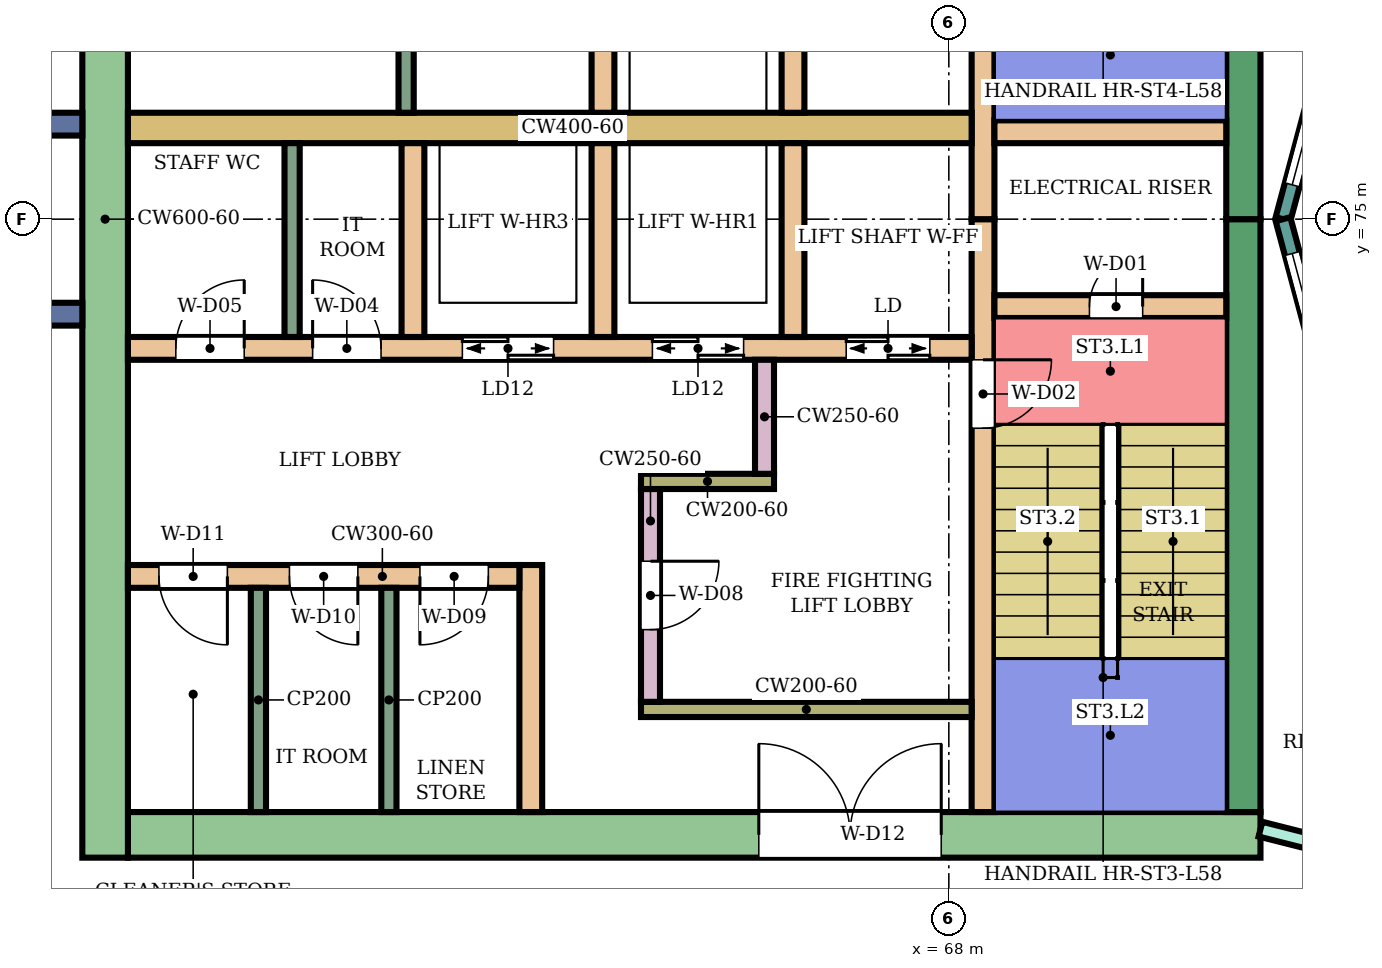
"""IFC4 building model, lengths in metres.
Left out: names, types, materials, properties, quantities, classifications, styles, units other than length and angle.
Written with IfcOpenShell. Run it as: python <this file> out.ifc"""

import sys

from ifc_helpers import new_model, si_unit, direction, frame, frame_2d, origin, place, context, subcontext, project, spatial, rectangle, extrude, element, fill, save


model = new_model("IFC4")
c1 = context("Model", 3, precision=1e-05, world=origin(), true_north=direction((0.0, 1.0)))
c2 = subcontext(c1, "Body", "Model", "MODEL_VIEW")
j1 = project(units=[si_unit("LENGTHUNIT", "METRE"), si_unit("PLANEANGLEUNIT", "RADIAN")], contexts=[c1])
p1 = place(None, origin())
s1 = spatial("IfcSite", under=j1, at=p1, CompositionType="ELEMENT")
p2 = place(p1, origin())
s2 = spatial("IfcBuilding", under=s1, at=p2, CompositionType="ELEMENT")
p3 = place(p2, frame((0.0, 0.0, 254.1)))
s3 = spatial("IfcBuildingStorey", under=s2, at=p3, CompositionType="ELEMENT", Elevation=254.1)
p4 = place(p3, frame((72.1, 66.9, 0.0), z_axis=(0.0, 0.0, 1.0), x_axis=(-1.0, 0.0, 0.0)))
e1 = element("IfcWall", 1, at=p4, inside=s3, PredefinedType="SHEAR", context=c2, shape_type="SweptSolid", body=[
    extrude(rectangle(XDim=14.9, YDim=0.6, at=frame_2d((7.45, 0.0))), origin(), (0.0, 0.0, 1.0), 3.88),
])
p5 = place(p4, frame((4.2, 0.0, 0.0)))
e2 = element("IfcOpeningElement", 2, at=p5, cuts=e1, PredefinedType="OPENING", context=c2, shape_type="SweptSolid", body=[
    extrude(rectangle(XDim=2.4, YDim=2.4, at=frame_2d((1.2, 1.2))), frame((0.0, 0.31, 0.0), z_axis=(0.0, -1.0, 0.0), x_axis=(1.0, 0.0, 0.0)), (0.0, 0.0, 1.0), 0.62),
])
for number, where, z_axis, x_axis in (
    (3, (71.875, 75.0, 0.0), (0.0, 0.0, 1.0), (0.0, -1.0, 0.0)),
    (4, (71.875, 82.8, 0.0), (0.0, 0.0, 1.0), (0.0, -1.0, 0.0)),
):
    element("IfcWall", number, at=place(p3, frame(where, z_axis=z_axis, x_axis=x_axis)), inside=s3, PredefinedType="SHEAR", context=c2, shape_type="SweptSolid", body=[
        extrude(rectangle(XDim=7.8, YDim=0.45, at=frame_2d((3.9, 0.0))), origin(), (0.0, 0.0, 1.0), 3.88),
    ])
p6 = place(p3, frame((56.9, 83.4, 0.0), z_axis=(0.0, 0.0, 1.0), x_axis=(0.0, -1.0, 0.0)))
e5 = element("IfcWall", 5, at=p6, inside=s3, PredefinedType="SHEAR", context=c2, shape_type="SweptSolid", body=[
    extrude(rectangle(XDim=16.8, YDim=0.6, at=frame_2d((8.4, 0.0))), origin(), (0.0, 0.0, 1.0), 3.88),
])
p7 = place(p3, frame((68.45, 75.0, 0.0), z_axis=(0.0, 0.0, 1.0), x_axis=(0.0, -1.0, 0.0)))
e6 = element("IfcWall", 6, at=p7, inside=s3, PredefinedType="SHEAR", context=c2, shape_type="SweptSolid", body=[
    extrude(rectangle(XDim=7.8, YDim=0.3, at=frame_2d((3.9, 0.0))), origin(), (0.0, 0.0, 1.0), 3.88),
])
p8 = place(p7, frame((1.85, 0.0, 0.0)))
e7 = element("IfcOpeningElement", 7, at=p8, cuts=e6, PredefinedType="OPENING", context=c2, shape_type="SweptSolid", body=[
    extrude(rectangle(XDim=0.9, YDim=2.1, at=frame_2d((0.45, 1.05))), frame((0.0, 0.16, 0.0), z_axis=(0.0, -1.0, 0.0), x_axis=(1.0, 0.0, 0.0)), (0.0, 0.0, 1.0), 0.32),
])
p9 = place(p3, frame((68.45, 82.8, 0.0), z_axis=(0.0, 0.0, 1.0), x_axis=(0.0, -1.0, 0.0)))
e8 = element("IfcWall", 8, at=p9, inside=s3, PredefinedType="SHEAR", context=c2, shape_type="SweptSolid", body=[
    extrude(rectangle(XDim=7.8, YDim=0.3, at=frame_2d((3.9, 0.0))), origin(), (0.0, 0.0, 1.0), 3.88),
])
p10 = place(p9, frame((0.45, 0.0, 0.0)))
e9 = element("IfcOpeningElement", 9, at=p10, cuts=e8, PredefinedType="OPENING", context=c2, shape_type="SweptSolid", body=[
    extrude(rectangle(XDim=0.9, YDim=2.1, at=frame_2d((0.45, 1.05))), frame((0.0, 0.16, 0.0), z_axis=(0.0, -1.0, 0.0), x_axis=(1.0, 0.0, 0.0)), (0.0, 0.0, 1.0), 0.32),
])
p11 = place(p3, frame((71.65, 73.85, 0.0), z_axis=(0.0, 0.0, 1.0), x_axis=(-1.0, 0.0, 0.0)))
e10 = element("IfcWall", 10, at=p11, inside=s3, PredefinedType="SHEAR", context=c2, shape_type="SweptSolid", body=[
    extrude(rectangle(XDim=3.05, YDim=0.3, at=frame_2d((1.525, 0.0))), origin(), (0.0, 0.0, 1.0), 3.88),
])
p12 = place(p11, frame((1.1, 0.0, 0.0)))
e11 = element("IfcOpeningElement", 11, at=p12, cuts=e10, PredefinedType="OPENING", context=c2, shape_type="SweptSolid", body=[
    extrude(rectangle(XDim=0.7, YDim=2.0, at=frame_2d((0.35, 1.0))), frame((0.0, 0.16, 0.0), z_axis=(0.0, -1.0, 0.0), x_axis=(1.0, 0.0, 0.0)), (0.0, 0.0, 1.0), 0.32),
])
p13 = place(p3, frame((71.65, 76.15, 0.0), z_axis=(0.0, 0.0, 1.0), x_axis=(-1.0, 0.0, 0.0)))
e12 = element("IfcWall", 12, at=p13, inside=s3, PredefinedType="SHEAR", context=c2, shape_type="SweptSolid", body=[
    extrude(rectangle(XDim=3.05, YDim=0.3, at=frame_2d((1.525, 0.0))), origin(), (0.0, 0.0, 1.0), 3.88),
])
p14 = place(p3, frame((68.3, 73.3, 0.0), z_axis=(0.0, 0.0, 1.0), x_axis=(-1.0, 0.0, 0.0)))
e13 = element("IfcWall", 13, at=p14, inside=s3, PredefinedType="SHEAR", context=c2, shape_type="SweptSolid", body=[
    extrude(rectangle(XDim=11.1, YDim=0.3, at=frame_2d((5.55, 0.0))), origin(), (0.0, 0.0, 1.0), 3.88),
])
p15 = place(p14, frame((0.55, 0.0, 0.0)))
e14 = element("IfcOpeningElement", 14, at=p15, cuts=e13, PredefinedType="OPENING", context=c2, shape_type="SweptSolid", body=[
    extrude(rectangle(XDim=1.1, YDim=2.1, at=frame_2d((0.55, 1.05))), frame((0.0, 0.16, 0.0), z_axis=(0.0, -1.0, 0.0), x_axis=(1.0, 0.0, 0.0)), (0.0, 0.0, 1.0), 0.32),
])
p16 = place(p14, frame((3.0, 0.0, 0.0)))
e15 = element("IfcOpeningElement", 15, at=p16, cuts=e13, PredefinedType="OPENING", context=c2, shape_type="SweptSolid", body=[
    extrude(rectangle(XDim=1.2, YDim=2.1, at=frame_2d((0.6, 1.05))), frame((0.0, 0.16, 0.0), z_axis=(0.0, -1.0, 0.0), x_axis=(1.0, 0.0, 0.0)), (0.0, 0.0, 1.0), 0.32),
])
p17 = place(p14, frame((5.5, 0.0, 0.0)))
e16 = element("IfcOpeningElement", 16, at=p17, cuts=e13, PredefinedType="OPENING", context=c2, shape_type="SweptSolid", body=[
    extrude(rectangle(XDim=1.2, YDim=2.1, at=frame_2d((0.6, 1.05))), frame((0.0, 0.16, 0.0), z_axis=(0.0, -1.0, 0.0), x_axis=(1.0, 0.0, 0.0)), (0.0, 0.0, 1.0), 0.32),
])
p18 = place(p14, frame((7.77, 0.0, 0.0)))
e17 = element("IfcOpeningElement", 17, at=p18, cuts=e13, PredefinedType="OPENING", context=c2, shape_type="SweptSolid", body=[
    extrude(rectangle(XDim=0.9, YDim=2.1, at=frame_2d((0.45, 1.05))), frame((0.0, 0.16, 0.0), z_axis=(0.0, -1.0, 0.0), x_axis=(1.0, 0.0, 0.0)), (0.0, 0.0, 1.0), 0.32),
])
p19 = place(p14, frame((9.57, 0.0, 0.0)))
e18 = element("IfcOpeningElement", 18, at=p19, cuts=e13, PredefinedType="OPENING", context=c2, shape_type="SweptSolid", body=[
    extrude(rectangle(XDim=0.9, YDim=2.1, at=frame_2d((0.45, 1.05))), frame((0.0, 0.16, 0.0), z_axis=(0.0, -1.0, 0.0), x_axis=(1.0, 0.0, 0.0)), (0.0, 0.0, 1.0), 0.32),
])
p20 = place(p3, frame((68.3, 76.2, 0.0), z_axis=(0.0, 0.0, 1.0), x_axis=(-1.0, 0.0, 0.0)))
e19 = element("IfcWall", 19, at=p20, inside=s3, PredefinedType="SHEAR", context=c2, shape_type="SweptSolid", body=[
    extrude(rectangle(XDim=11.1, YDim=0.4, at=frame_2d((5.55, 0.0))), origin(), (0.0, 0.0, 1.0), 3.88),
])
for number, where, z_axis, x_axis in (
    (20, (65.95, 76.0, 0.0), (0.0, 0.0, 1.0), (0.0, -1.0, 0.0)),
    (21, (63.45, 76.0, 0.0), (0.0, 0.0, 1.0), (0.0, -1.0, 0.0)),
    (22, (60.95, 76.0, 0.0), (0.0, 0.0, 1.0), (0.0, -1.0, 0.0)),
    (23, (65.95, 78.95, 0.0), (0.0, 0.0, 1.0), (0.0, -1.0, 0.0)),
    (24, (63.45, 78.95, 0.0), (0.0, 0.0, 1.0), (0.0, -1.0, 0.0)),
):
    element("IfcWall", number, at=place(p3, frame(where, z_axis=z_axis, x_axis=x_axis)), inside=s3, PredefinedType="SHEAR", context=c2, shape_type="SweptSolid", body=[
        extrude(rectangle(XDim=2.55, YDim=0.3, at=frame_2d((1.275, 0.0))), origin(), (0.0, 0.0, 1.0), 3.88),
    ])
p21 = place(p3, frame((68.3, 68.55, 0.0), z_axis=(0.0, 0.0, 1.0), x_axis=(-1.0, 0.0, 0.0)))
e25 = element("IfcWall", 25, at=p21, inside=s3, PredefinedType="SHEAR", context=c2, shape_type="SweptSolid", body=[
    extrude(rectangle(XDim=4.35, YDim=0.2, at=frame_2d((2.175, 0.0))), origin(), (0.0, 0.0, 1.0), 3.88),
])
p22 = place(p3, frame((64.075, 71.45, 0.0), z_axis=(0.0, 0.0, 1.0), x_axis=(0.0, -1.0, 0.0)))
e26 = element("IfcWall", 26, at=p22, inside=s3, PredefinedType="SHEAR", context=c2, shape_type="SweptSolid", body=[
    extrude(rectangle(XDim=2.8, YDim=0.25, at=frame_2d((1.4, 0.0))), origin(), (0.0, 0.0, 1.0), 3.88),
])
p23 = place(p22, frame((0.95, 0.0, 0.0)))
e27 = element("IfcOpeningElement", 27, at=p23, cuts=e26, PredefinedType="OPENING", context=c2, shape_type="SweptSolid", body=[
    extrude(rectangle(XDim=0.9, YDim=2.1, at=frame_2d((0.45, 1.05))), frame((0.0, 0.135, 0.0), z_axis=(0.0, -1.0, 0.0), x_axis=(1.0, 0.0, 0.0)), (0.0, 0.0, 1.0), 0.27),
])
p24 = place(p3, frame((65.7, 71.55, 0.0), z_axis=(0.0, 0.0, 1.0), x_axis=(-1.0, 0.0, 0.0)))
e28 = element("IfcWall", 28, at=p24, inside=s3, PredefinedType="SHEAR", context=c2, shape_type="SweptSolid", body=[
    extrude(rectangle(XDim=1.75, YDim=0.2, at=frame_2d((0.875, 0.0))), origin(), (0.0, 0.0, 1.0), 3.88),
])
p25 = place(p3, frame((65.575, 73.15, 0.0), z_axis=(0.0, 0.0, 1.0), x_axis=(0.0, -1.0, 0.0)))
e29 = element("IfcWall", 29, at=p25, inside=s3, PredefinedType="SHEAR", context=c2, shape_type="SweptSolid", body=[
    extrude(rectangle(XDim=1.5, YDim=0.25, at=frame_2d((0.75, 0.0))), origin(), (0.0, 0.0, 1.0), 3.88),
])
p26 = place(p3, frame((62.5, 70.45, 0.0), z_axis=(0.0, 0.0, 1.0), x_axis=(0.0, -1.0, 0.0)))
e30 = element("IfcWall", 30, at=p26, inside=s3, PredefinedType="SHEAR", context=c2, shape_type="SweptSolid", body=[
    extrude(rectangle(XDim=3.25, YDim=0.3, at=frame_2d((1.625, 0.0))), origin(), (0.0, 0.0, 1.0), 3.88),
])
p27 = place(p3, frame((62.35, 70.3, 0.0), z_axis=(0.0, 0.0, 1.0), x_axis=(-1.0, 0.0, 0.0)))
e31 = element("IfcWall", 31, at=p27, inside=s3, PredefinedType="SHEAR", context=c2, shape_type="SweptSolid", body=[
    extrude(rectangle(XDim=5.15, YDim=0.3, at=frame_2d((2.575, 0.0))), origin(), (0.0, 0.0, 1.0), 3.88),
])
p28 = place(p27, frame((0.408, 0.0, 0.0)))
e32 = element("IfcOpeningElement", 32, at=p28, cuts=e31, PredefinedType="OPENING", context=c2, shape_type="SweptSolid", body=[
    extrude(rectangle(XDim=0.9, YDim=2.1, at=frame_2d((0.45, 1.05))), frame((0.0, 0.16, 0.0), z_axis=(0.0, -1.0, 0.0), x_axis=(1.0, 0.0, 0.0)), (0.0, 0.0, 1.0), 0.32),
])
p29 = place(p27, frame((2.125, 0.0, 0.0)))
e33 = element("IfcOpeningElement", 33, at=p29, cuts=e31, PredefinedType="OPENING", context=c2, shape_type="SweptSolid", body=[
    extrude(rectangle(XDim=0.9, YDim=2.1, at=frame_2d((0.45, 1.05))), frame((0.0, 0.16, 0.0), z_axis=(0.0, -1.0, 0.0), x_axis=(1.0, 0.0, 0.0)), (0.0, 0.0, 1.0), 0.32),
])
p30 = place(p27, frame((3.842, 0.0, 0.0)))
e34 = element("IfcOpeningElement", 34, at=p30, cuts=e31, PredefinedType="OPENING", context=c2, shape_type="SweptSolid", body=[
    extrude(rectangle(XDim=0.9, YDim=2.1, at=frame_2d((0.45, 1.05))), frame((0.0, 0.16, 0.0), z_axis=(0.0, -1.0, 0.0), x_axis=(1.0, 0.0, 0.0)), (0.0, 0.0, 1.0), 0.32),
])
for number, where, z_axis, x_axis in (
    (35, (56.6, 76.25, 0.0), (0.0, 0.0, 1.0), (-1.0, 0.0, 0.0)),
    (36, (56.6, 73.75, 0.0), (0.0, 0.0, 1.0), (-1.0, 0.0, 0.0)),
):
    element("IfcWall", number, at=place(p3, frame(where, z_axis=z_axis, x_axis=x_axis)), inside=s3, PredefinedType="NOTDEFINED", context=c2, shape_type="SweptSolid", body=[
        extrude(rectangle(XDim=2.416, YDim=0.3, at=frame_2d((1.208, 0.0))), origin(), (0.0, 0.0, 1.0), 4.2),
    ])
p31 = place(p3, frame((73.415, 78.802, 0.0), z_axis=(0.0, 0.0, 1.0), x_axis=(-0.258789828301, -0.965933654434, 0.0)))
e37 = element("IfcWall", 37, at=p31, inside=s3, PredefinedType="NOTDEFINED", context=c2, shape_type="SweptSolid", body=[
    extrude(rectangle(XDim=3.936, YDim=0.2, at=frame_2d((1.968, 0.0))), origin(), (0.0, 0.0, 1.0), 4.2),
])
p32 = place(p31, frame((0.468, 0.0, 0.9)))
e38 = element("IfcOpeningElement", 38, at=p32, cuts=e37, PredefinedType="OPENING", context=c2, shape_type="SweptSolid", body=[
    extrude(rectangle(XDim=3.0, YDim=2.3, at=frame_2d((1.5, 1.15))), frame((0.0, 0.11, 0.0), z_axis=(0.0, -1.0, 0.0), x_axis=(1.0, 0.0, 0.0)), (0.0, 0.0, 1.0), 0.22),
])
p33 = place(p3, frame((72.396, 75.0, 0.0), z_axis=(0.0, 0.0, 1.0), x_axis=(0.258789828301, -0.965933654434, 0.0)))
e39 = element("IfcWall", 39, at=p33, inside=s3, PredefinedType="NOTDEFINED", context=c2, shape_type="SweptSolid", body=[
    extrude(rectangle(XDim=3.936, YDim=0.2, at=frame_2d((1.968, 0.0))), origin(), (0.0, 0.0, 1.0), 4.2),
])
p34 = place(p33, frame((0.468, 0.0, 0.9)))
e40 = element("IfcOpeningElement", 40, at=p34, cuts=e39, PredefinedType="OPENING", context=c2, shape_type="SweptSolid", body=[
    extrude(rectangle(XDim=3.0, YDim=2.3, at=frame_2d((1.5, 1.15))), frame((0.0, 0.11, 0.0), z_axis=(0.0, -1.0, 0.0), x_axis=(1.0, 0.0, 0.0)), (0.0, 0.0, 1.0), 0.22),
])
p35 = place(p3, frame((72.1, 66.975, 0.0), z_axis=(0.0, 0.0, 1.0), x_axis=(0.969471314457, -0.245204752086, 0.0)))
e41 = element("IfcWall", 41, at=p35, inside=s3, PredefinedType="PARTITIONING", context=c2, shape_type="SweptSolid", body=[
    extrude(rectangle(XDim=2.582, YDim=0.2, at=frame_2d((1.291, 0.0))), origin(), (0.0, 0.0, 1.0), 3.75),
])
p36 = place(p35, frame((0.841, 0.0, 0.0)))
e42 = element("IfcOpeningElement", 42, at=p36, cuts=e41, PredefinedType="OPENING", context=c2, shape_type="SweptSolid", body=[
    extrude(rectangle(XDim=0.9, YDim=2.1, at=frame_2d((0.45, 1.05))), frame((0.0, 0.11, 0.0), z_axis=(0.0, -1.0, 0.0), x_axis=(1.0, 0.0, 0.0)), (0.0, 0.0, 1.0), 0.22),
])
for number, where, z_axis, x_axis in (
    (43, (59.36, 76.0, 0.0), (0.0, 0.0, 1.0), (0.0, -1.0, 0.0)),
    (44, (60.86, 78.95, 0.0), (0.0, 0.0, 1.0), (0.0, -1.0, 0.0)),
):
    element("IfcWall", number, at=place(p3, frame(where, z_axis=z_axis, x_axis=x_axis)), inside=s3, PredefinedType="PARTITIONING", context=c2, shape_type="SweptSolid", body=[
        extrude(rectangle(XDim=2.55, YDim=0.2, at=frame_2d((1.275, 0.0))), origin(), (0.0, 0.0, 1.0), 3.88),
    ])
for number, where, z_axis, x_axis in (
    (45, (60.633, 70.15, 0.0), (0.0, 0.0, 1.0), (0.0, -1.0, 0.0)),
    (46, (58.917, 70.15, 0.0), (0.0, 0.0, 1.0), (0.0, -1.0, 0.0)),
):
    element("IfcWall", number, at=place(p3, frame(where, z_axis=z_axis, x_axis=x_axis)), inside=s3, PredefinedType="PARTITIONING", context=c2, shape_type="SweptSolid", body=[
        extrude(rectangle(XDim=2.95, YDim=0.2, at=frame_2d((1.475, 0.0))), origin(), (0.0, 0.0, 1.0), 3.88),
    ])
p37 = place(p32, origin())
e47 = element("IfcWindow", 47, at=p37, inside=s3, PartitioningType="SINGLE_PANEL", PredefinedType="WINDOW", context=c2, shape_type="SweptSolid", body=[
    extrude(rectangle(XDim=3.0, YDim=2.3, at=frame_2d((1.5, 1.15))), frame((0.0, 0.03, 0.0), z_axis=(0.0, -1.0, 0.0), x_axis=(1.0, 0.0, 0.0)), (0.0, 0.0, 1.0), 0.06),
])
fill(e38, e47)
p38 = place(p34, origin())
e48 = element("IfcWindow", 48, at=p38, inside=s3, PartitioningType="SINGLE_PANEL", PredefinedType="WINDOW", context=c2, shape_type="SweptSolid", body=[
    extrude(rectangle(XDim=3.0, YDim=2.3, at=frame_2d((1.5, 1.15))), frame((0.0, 0.03, 0.0), z_axis=(0.0, -1.0, 0.0), x_axis=(1.0, 0.0, 0.0)), (0.0, 0.0, 1.0), 0.06),
])
fill(e40, e48)
p39 = place(p12, frame((0.7, 0.0, 0.0), z_axis=(0.0, 0.0, 1.0), x_axis=(-1.0, 0.0, 0.0)))
e49 = element("IfcDoor", 49, at=p39, inside=s3, OperationType="SINGLE_SWING_RIGHT", PredefinedType="DOOR", context=c2, shape_type="SweptSolid", body=[
    extrude(rectangle(XDim=0.7, YDim=2.0, at=frame_2d((0.35, 1.0))), frame((0.0, 0.025, 0.0), z_axis=(0.0, -1.0, 0.0), x_axis=(1.0, 0.0, 0.0)), (0.0, 0.0, 1.0), 0.05),
])
fill(e11, e49)
p40 = place(p8, origin())
e50 = element("IfcDoor", 50, at=p40, inside=s3, OperationType="SINGLE_SWING_LEFT", PredefinedType="DOOR", context=c2, shape_type="SweptSolid", body=[
    extrude(rectangle(XDim=0.9, YDim=2.1, at=frame_2d((0.45, 1.05))), frame((0.0, 0.025, 0.0), z_axis=(0.0, -1.0, 0.0), x_axis=(1.0, 0.0, 0.0)), (0.0, 0.0, 1.0), 0.05),
])
fill(e7, e50)
p41 = place(p15, origin())
e51 = element("IfcDoor", 51, at=p41, inside=s3, OperationType="DOUBLE_DOOR_SLIDING", PredefinedType="DOOR", context=c2, shape_type="SweptSolid", body=[
    extrude(rectangle(XDim=1.1, YDim=2.1, at=frame_2d((0.55, 1.05))), frame((0.0, 0.025, 0.0), z_axis=(0.0, -1.0, 0.0), x_axis=(1.0, 0.0, 0.0)), (0.0, 0.0, 1.0), 0.05),
])
fill(e14, e51)
p42 = place(p16, origin())
e52 = element("IfcDoor", 52, at=p42, inside=s3, OperationType="DOUBLE_DOOR_SLIDING", PredefinedType="DOOR", context=c2, shape_type="SweptSolid", body=[
    extrude(rectangle(XDim=1.2, YDim=2.1, at=frame_2d((0.6, 1.05))), frame((0.0, 0.025, 0.0), z_axis=(0.0, -1.0, 0.0), x_axis=(1.0, 0.0, 0.0)), (0.0, 0.0, 1.0), 0.05),
])
fill(e15, e52)
p43 = place(p17, origin())
e53 = element("IfcDoor", 53, at=p43, inside=s3, OperationType="DOUBLE_DOOR_SLIDING", PredefinedType="DOOR", context=c2, shape_type="SweptSolid", body=[
    extrude(rectangle(XDim=1.2, YDim=2.1, at=frame_2d((0.6, 1.05))), frame((0.0, 0.025, 0.0), z_axis=(0.0, -1.0, 0.0), x_axis=(1.0, 0.0, 0.0)), (0.0, 0.0, 1.0), 0.05),
])
fill(e16, e53)
p44 = place(p18, frame((0.9, 0.0, 0.0), z_axis=(0.0, 0.0, 1.0), x_axis=(-1.0, 0.0, 0.0)))
e54 = element("IfcDoor", 54, at=p44, inside=s3, OperationType="SINGLE_SWING_LEFT", PredefinedType="DOOR", context=c2, shape_type="SweptSolid", body=[
    extrude(rectangle(XDim=0.9, YDim=2.1, at=frame_2d((0.45, 1.05))), frame((0.0, 0.025, 0.0), z_axis=(0.0, -1.0, 0.0), x_axis=(1.0, 0.0, 0.0)), (0.0, 0.0, 1.0), 0.05),
])
fill(e17, e54)
p45 = place(p19, frame((0.9, 0.0, 0.0), z_axis=(0.0, 0.0, 1.0), x_axis=(-1.0, 0.0, 0.0)))
e55 = element("IfcDoor", 55, at=p45, inside=s3, OperationType="SINGLE_SWING_RIGHT", PredefinedType="DOOR", context=c2, shape_type="SweptSolid", body=[
    extrude(rectangle(XDim=0.9, YDim=2.1, at=frame_2d((0.45, 1.05))), frame((0.0, 0.025, 0.0), z_axis=(0.0, -1.0, 0.0), x_axis=(1.0, 0.0, 0.0)), (0.0, 0.0, 1.0), 0.05),
])
fill(e18, e55)
p46 = place(p23, origin())
e56 = element("IfcDoor", 56, at=p46, inside=s3, OperationType="SINGLE_SWING_LEFT", PredefinedType="DOOR", context=c2, shape_type="SweptSolid", body=[
    extrude(rectangle(XDim=0.9, YDim=2.1, at=frame_2d((0.45, 1.05))), frame((0.0, 0.025, 0.0), z_axis=(0.0, -1.0, 0.0), x_axis=(1.0, 0.0, 0.0)), (0.0, 0.0, 1.0), 0.05),
])
fill(e27, e56)
p47 = place(p28, origin())
e57 = element("IfcDoor", 57, at=p47, inside=s3, OperationType="SINGLE_SWING_RIGHT", PredefinedType="DOOR", context=c2, shape_type="SweptSolid", body=[
    extrude(rectangle(XDim=0.9, YDim=2.1, at=frame_2d((0.45, 1.05))), frame((0.0, 0.025, 0.0), z_axis=(0.0, -1.0, 0.0), x_axis=(1.0, 0.0, 0.0)), (0.0, 0.0, 1.0), 0.05),
])
fill(e32, e57)
p48 = place(p29, origin())
e58 = element("IfcDoor", 58, at=p48, inside=s3, OperationType="SINGLE_SWING_LEFT", PredefinedType="DOOR", context=c2, shape_type="SweptSolid", body=[
    extrude(rectangle(XDim=0.9, YDim=2.1, at=frame_2d((0.45, 1.05))), frame((0.0, 0.025, 0.0), z_axis=(0.0, -1.0, 0.0), x_axis=(1.0, 0.0, 0.0)), (0.0, 0.0, 1.0), 0.05),
])
fill(e33, e58)
p49 = place(p30, origin())
e59 = element("IfcDoor", 59, at=p49, inside=s3, OperationType="SINGLE_SWING_LEFT", PredefinedType="DOOR", context=c2, shape_type="SweptSolid", body=[
    extrude(rectangle(XDim=0.9, YDim=2.1, at=frame_2d((0.45, 1.05))), frame((0.0, 0.025, 0.0), z_axis=(0.0, -1.0, 0.0), x_axis=(1.0, 0.0, 0.0)), (0.0, 0.0, 1.0), 0.05),
])
fill(e34, e59)
p50 = place(p5, frame((2.4, 0.0, 0.0), z_axis=(0.0, 0.0, 1.0), x_axis=(-1.0, 0.0, 0.0)))
e60 = element("IfcDoor", 60, at=p50, inside=s3, OperationType="DOUBLE_DOOR_SINGLE_SWING", PredefinedType="DOOR", context=c2, shape_type="SweptSolid", body=[
    extrude(rectangle(XDim=2.4, YDim=2.4, at=frame_2d((1.2, 1.2))), frame((0.0, 0.025, 0.0), z_axis=(0.0, -1.0, 0.0), x_axis=(1.0, 0.0, 0.0)), (0.0, 0.0, 1.0), 0.05),
])
fill(e2, e60)
save(model, sys.argv[1])
